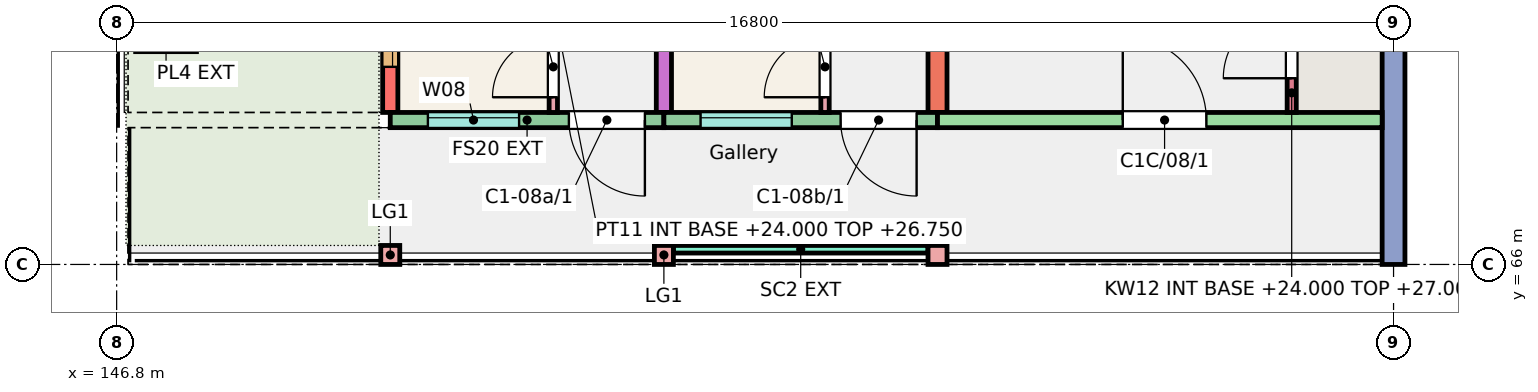
"""IFC4 building model, lengths in metres.
Left out: names, types, materials, properties, quantities, classifications, styles, units other than length and angle.
Written with IfcOpenShell. Run it as: python <this file> out.ifc"""

import sys

from ifc_helpers import new_model, si_unit, direction, frame, frame_2d, origin, origin_2d, place, context, subcontext, project, spatial, rectangle, extrude, element, fill, save


model = new_model("IFC4")
c1 = context("Model", 3, precision=1e-05, world=origin(), true_north=direction((0.0, 1.0)))
c2 = subcontext(c1, "Body", "Model", "MODEL_VIEW")
j1 = project(units=[si_unit("LENGTHUNIT", "METRE"), si_unit("PLANEANGLEUNIT", "RADIAN")], contexts=[c1])
p1 = place(None, origin())
s1 = spatial("IfcSite", under=j1, at=p1, CompositionType="ELEMENT")
p2 = place(p1, origin())
s2 = spatial("IfcBuilding", under=s1, at=p2, CompositionType="ELEMENT")
p3 = place(p2, frame((0.0, 0.0, 24.0)))
s3 = spatial("IfcBuildingStorey", under=s2, at=p3, CompositionType="ELEMENT", Elevation=24.0)
p4 = place(p3, frame((150.4, 68.0, 0.0), z_axis=(0.0, 0.0, 1.0), x_axis=(0.0, 1.0, 0.0)))
e1 = element("IfcWall", 1, at=p4, inside=s3, PredefinedType="SHEAR", context=c2, shape_type="SweptSolid", body=[
    extrude(rectangle(XDim=9.0, YDim=0.2, at=frame_2d((4.5, 0.0))), origin(), (0.0, 0.0, 1.0), 3.0),
])
p5 = place(p4, frame((0.6, 0.0, 0.9)))
e2 = element("IfcOpeningElement", 2, at=p5, cuts=e1, PredefinedType="OPENING", context=c2, shape_type="SweptSolid", body=[
    extrude(rectangle(XDim=1.2, YDim=1.5, at=frame_2d((0.6, 0.75))), frame((0.0, 0.11, 0.0), z_axis=(0.0, -1.0, 0.0), x_axis=(1.0, 0.0, 0.0)), (0.0, 0.0, 1.0), 0.22),
])
p6 = place(p4, frame((7.653, 0.0, 0.9)))
e3 = element("IfcOpeningElement", 3, at=p6, cuts=e1, PredefinedType="OPENING", context=c2, shape_type="SweptSolid", body=[
    extrude(rectangle(XDim=1.2, YDim=1.5, at=frame_2d((0.6, 0.75))), frame((0.0, 0.11, 0.0), z_axis=(0.0, -1.0, 0.0), x_axis=(1.0, 0.0, 0.0)), (0.0, 0.0, 1.0), 0.22),
])
p7 = place(p4, frame((6.405, 0.0, 0.0)))
e4 = element("IfcOpeningElement", 4, at=p7, cuts=e1, PredefinedType="OPENING", context=c2, shape_type="SweptSolid", body=[
    extrude(rectangle(XDim=1.0, YDim=2.1, at=frame_2d((0.5, 1.05))), frame((0.0, 0.11, 0.0), z_axis=(0.0, -1.0, 0.0), x_axis=(1.0, 0.0, 0.0)), (0.0, 0.0, 1.0), 0.22),
])
p8 = place(p3, frame((154.0, 68.0, 0.0), z_axis=(0.0, 0.0, 1.0), x_axis=(0.0, 1.0, 0.0)))
e5 = element("IfcWall", 5, at=p8, inside=s3, PredefinedType="SHEAR", context=c2, shape_type="SweptSolid", body=[
    extrude(rectangle(XDim=9.0, YDim=0.2, at=frame_2d((4.5, 0.0))), origin(), (0.0, 0.0, 1.0), 3.0),
])
p9 = place(p3, frame((157.6, 68.0, 0.0), z_axis=(0.0, 0.0, 1.0), x_axis=(0.0, 1.0, 0.0)))
e6 = element("IfcWall", 6, at=p9, inside=s3, PredefinedType="SHEAR", context=c2, shape_type="SweptSolid", body=[
    extrude(rectangle(XDim=9.0, YDim=0.25, at=frame_2d((4.5, 0.0))), origin(), (0.0, 0.0, 1.0), 3.0),
])
p10 = place(p3, frame((163.6, 66.0, 0.0), z_axis=(0.0, 0.0, 1.0), x_axis=(0.0, 1.0, 0.0)))
e7 = element("IfcWall", 7, at=p10, inside=s3, PredefinedType="SHEAR", context=c2, shape_type="SweptSolid", body=[
    extrude(rectangle(XDim=11.0, YDim=0.3, at=frame_2d((5.5, 0.0))), origin(), (0.0, 0.0, 1.0), 3.0),
])
p11 = place(p3, frame((150.4, 67.9, 0.0), z_axis=(0.0, 0.0, 1.0), x_axis=(1.0, 0.0, 0.0)))
e8 = element("IfcWall", 8, at=p11, inside=s3, PredefinedType="SOLIDWALL", context=c2, shape_type="SweptSolid", body=[
    extrude(rectangle(XDim=3.6, YDim=0.2, at=frame_2d((1.8, 0.0))), origin(), (0.0, 0.0, 1.0), 3.0),
])
p12 = place(p11, frame((0.495, 0.0, 1.1)))
e9 = element("IfcOpeningElement", 9, at=p12, cuts=e8, PredefinedType="OPENING", context=c2, shape_type="SweptSolid", body=[
    extrude(rectangle(XDim=1.2, YDim=1.3, at=frame_2d((0.6, 0.65))), frame((0.0, 0.11, 0.0), z_axis=(0.0, -1.0, 0.0), x_axis=(1.0, 0.0, 0.0)), (0.0, 0.0, 1.0), 0.22),
])
p13 = place(p11, frame((2.35, 0.0, 0.0)))
e10 = element("IfcOpeningElement", 10, at=p13, cuts=e8, PredefinedType="OPENING", context=c2, shape_type="SweptSolid", body=[
    extrude(rectangle(XDim=1.0, YDim=2.1, at=frame_2d((0.5, 1.05))), frame((0.0, 0.11, 0.0), z_axis=(0.0, -1.0, 0.0), x_axis=(1.0, 0.0, 0.0)), (0.0, 0.0, 1.0), 0.22),
])
p14 = place(p3, frame((154.0, 67.9, 0.0), z_axis=(0.0, 0.0, 1.0), x_axis=(1.0, 0.0, 0.0)))
e11 = element("IfcWall", 11, at=p14, inside=s3, PredefinedType="SOLIDWALL", context=c2, shape_type="SweptSolid", body=[
    extrude(rectangle(XDim=3.6, YDim=0.2, at=frame_2d((1.8, 0.0))), origin(), (0.0, 0.0, 1.0), 3.0),
])
p15 = place(p14, frame((0.482, 0.0, 1.1)))
e12 = element("IfcOpeningElement", 12, at=p15, cuts=e11, PredefinedType="OPENING", context=c2, shape_type="SweptSolid", body=[
    extrude(rectangle(XDim=1.2, YDim=1.3, at=frame_2d((0.6, 0.65))), frame((0.0, 0.11, 0.0), z_axis=(0.0, -1.0, 0.0), x_axis=(1.0, 0.0, 0.0)), (0.0, 0.0, 1.0), 0.22),
])
p16 = place(p14, frame((2.325, 0.0, 0.0)))
e13 = element("IfcOpeningElement", 13, at=p16, cuts=e11, PredefinedType="OPENING", context=c2, shape_type="SweptSolid", body=[
    extrude(rectangle(XDim=1.0, YDim=2.1, at=frame_2d((0.5, 1.05))), frame((0.0, 0.11, 0.0), z_axis=(0.0, -1.0, 0.0), x_axis=(1.0, 0.0, 0.0)), (0.0, 0.0, 1.0), 0.22),
])
p17 = place(p3, frame((157.6, 67.9, 0.0), z_axis=(0.0, 0.0, 1.0), x_axis=(1.0, 0.0, 0.0)))
e14 = element("IfcWall", 14, at=p17, inside=s3, PredefinedType="SHEAR", context=c2, shape_type="SweptSolid", body=[
    extrude(rectangle(XDim=5.85, YDim=0.2, at=frame_2d((2.925, 0.0))), origin(), (0.0, 0.0, 1.0), 3.0),
])
p18 = place(p17, frame((2.438, 0.0, 0.0)))
e15 = element("IfcOpeningElement", 15, at=p18, cuts=e14, PredefinedType="OPENING", context=c2, shape_type="SweptSolid", body=[
    extrude(rectangle(XDim=1.1, YDim=2.1, at=frame_2d((0.55, 1.05))), frame((0.0, 0.11, 0.0), z_axis=(0.0, -1.0, 0.0), x_axis=(1.0, 0.0, 0.0)), (0.0, 0.0, 1.0), 0.22),
])
p19 = place(p3, frame((162.26, 68.0, 0.0), z_axis=(0.0, 0.0, 1.0), x_axis=(0.0, 1.0, 0.0)))
e16 = element("IfcWall", 16, at=p19, inside=s3, PredefinedType="SHEAR", context=c2, shape_type="SweptSolid", body=[
    extrude(rectangle(XDim=1.72, YDim=0.12, at=frame_2d((0.86, 0.0))), origin(), (0.0, 0.0, 1.0), 3.0),
])
p20 = place(p19, frame((0.45, 0.0, 0.0)))
e17 = element("IfcOpeningElement", 17, at=p20, cuts=e16, PredefinedType="OPENING", context=c2, shape_type="SweptSolid", body=[
    extrude(rectangle(XDim=0.9, YDim=2.1, at=frame_2d((0.45, 1.05))), frame((0.0, 0.07, 0.0), z_axis=(0.0, -1.0, 0.0), x_axis=(1.0, 0.0, 0.0)), (0.0, 0.0, 1.0), 0.14),
])
for number, where, z_axis, x_axis in (
    (18, (150.4, 66.125, 0.0), (0.0, 0.0, 1.0), (1.0, 0.0, 0.0)),
    (19, (154.0, 66.125, 0.0), (0.0, 0.0, 1.0), (1.0, 0.0, 0.0)),
    (20, (157.6, 66.125, 0.0), (0.0, 0.0, 1.0), (1.0, 0.0, 0.0)),
):
    element("IfcColumn", number, at=place(p3, frame(where, z_axis=z_axis, x_axis=x_axis)), inside=s3, PredefinedType="COLUMN", context=c2, shape_type="SweptSolid", body=[
        extrude(rectangle(XDim=0.25, YDim=0.25, at=origin_2d()), origin(), (0.0, 0.0, 1.0), 3.0),
    ])
p21 = place(p3, frame((147.05, 68.9, 0.01), z_axis=(0.0, 0.0, 1.0), x_axis=(1.0, 0.0, 0.0)))
e21 = element("IfcWall", 21, at=p21, inside=s3, PredefinedType="SOLIDWALL", context=c2, shape_type="SweptSolid", body=[
    extrude(rectangle(XDim=0.8, YDim=0.2, at=frame_2d((0.4, 0.0))), origin(), (0.0, 0.0, 1.0), 0.45),
])
p22 = place(p3, frame((154.125, 66.2, 0.0), z_axis=(0.0, 0.0, 1.0), x_axis=(1.0, 0.0, 0.0)))
e22 = element("IfcWall", 22, at=p22, inside=s3, PredefinedType="SOLIDWALL", context=c2, shape_type="SweptSolid", body=[
    extrude(rectangle(XDim=3.35, YDim=0.1, at=frame_2d((1.675, 0.0))), origin(), (0.0, 0.0, 1.0), 2.45),
])
p23 = place(p3, frame((152.545, 68.0, 0.0), z_axis=(0.0, 0.0, 1.0), x_axis=(0.0, 1.0, 0.0)))
e23 = element("IfcWall", 23, at=p23, inside=s3, PredefinedType="PARTITIONING", context=c2, shape_type="SweptSolid", body=[
    extrude(rectangle(XDim=4.7, YDim=0.11, at=frame_2d((2.35, 0.0))), origin(), (0.0, 0.0, 1.0), 2.75),
])
p24 = place(p23, frame((0.2, 0.0, 0.0)))
e24 = element("IfcOpeningElement", 24, at=p24, cuts=e23, PredefinedType="OPENING", context=c2, shape_type="SweptSolid", body=[
    extrude(rectangle(XDim=0.8, YDim=2.1, at=frame_2d((0.4, 1.05))), frame((0.0, 0.065, 0.0), z_axis=(0.0, -1.0, 0.0), x_axis=(1.0, 0.0, 0.0)), (0.0, 0.0, 1.0), 0.13),
])
p25 = place(p23, frame((3.75, 0.0, 0.0)))
e25 = element("IfcOpeningElement", 25, at=p25, cuts=e23, PredefinedType="OPENING", context=c2, shape_type="SweptSolid", body=[
    extrude(rectangle(XDim=0.8, YDim=2.1, at=frame_2d((0.4, 1.05))), frame((0.0, 0.065, 0.0), z_axis=(0.0, -1.0, 0.0), x_axis=(1.0, 0.0, 0.0)), (0.0, 0.0, 1.0), 0.13),
])
p26 = place(p3, frame((156.12, 68.0, 0.0), z_axis=(0.0, 0.0, 1.0), x_axis=(0.0, 1.0, 0.0)))
e26 = element("IfcWall", 26, at=p26, inside=s3, PredefinedType="PARTITIONING", context=c2, shape_type="SweptSolid", body=[
    extrude(rectangle(XDim=4.3, YDim=0.11, at=frame_2d((2.15, 0.0))), origin(), (0.0, 0.0, 1.0), 2.8),
])
p27 = place(p26, frame((0.2, 0.0, 0.0)))
e27 = element("IfcOpeningElement", 27, at=p27, cuts=e26, PredefinedType="OPENING", context=c2, shape_type="SweptSolid", body=[
    extrude(rectangle(XDim=0.8, YDim=2.1, at=frame_2d((0.4, 1.05))), frame((0.0, 0.065, 0.0), z_axis=(0.0, -1.0, 0.0), x_axis=(1.0, 0.0, 0.0)), (0.0, 0.0, 1.0), 0.13),
])
p28 = place(p26, frame((3.35, 0.0, 0.0)))
e28 = element("IfcOpeningElement", 28, at=p28, cuts=e26, PredefinedType="OPENING", context=c2, shape_type="SweptSolid", body=[
    extrude(rectangle(XDim=0.8, YDim=2.1, at=frame_2d((0.4, 1.05))), frame((0.0, 0.065, 0.0), z_axis=(0.0, -1.0, 0.0), x_axis=(1.0, 0.0, 0.0)), (0.0, 0.0, 1.0), 0.13),
])
p29 = place(p12, origin())
e29 = element("IfcWindow", 29, at=p29, inside=s3, PartitioningType="SINGLE_PANEL", PredefinedType="WINDOW", context=c2, shape_type="SweptSolid", body=[
    extrude(rectangle(XDim=1.2, YDim=1.3, at=frame_2d((0.6, 0.65))), frame((0.0, 0.06, 0.0), z_axis=(0.0, -1.0, 0.0), x_axis=(1.0, 0.0, 0.0)), (0.0, 0.0, 1.0), 0.06),
])
fill(e9, e29)
p30 = place(p5, origin())
e30 = element("IfcWindow", 30, at=p30, inside=s3, PartitioningType="SINGLE_PANEL", PredefinedType="WINDOW", context=c2, shape_type="SweptSolid", body=[
    extrude(rectangle(XDim=1.2, YDim=1.5, at=frame_2d((0.6, 0.75))), frame((0.0, 0.0, 0.0), z_axis=(0.0, -1.0, 0.0), x_axis=(1.0, 0.0, 0.0)), (0.0, 0.0, 1.0), 0.06),
])
fill(e2, e30)
p31 = place(p15, origin())
e31 = element("IfcWindow", 31, at=p31, inside=s3, PartitioningType="SINGLE_PANEL", PredefinedType="WINDOW", context=c2, shape_type="SweptSolid", body=[
    extrude(rectangle(XDim=1.2, YDim=1.3, at=frame_2d((0.6, 0.65))), frame((0.0, 0.06, 0.0), z_axis=(0.0, -1.0, 0.0), x_axis=(1.0, 0.0, 0.0)), (0.0, 0.0, 1.0), 0.06),
])
fill(e12, e31)
p32 = place(p13, origin())
e32 = element("IfcDoor", 32, at=p32, inside=s3, OperationType="SINGLE_SWING_RIGHT", PredefinedType="DOOR", context=c2, shape_type="SweptSolid", body=[
    extrude(rectangle(XDim=1.0, YDim=2.1, at=frame_2d((0.5, 1.05))), frame((0.0, 0.025, 0.0), z_axis=(0.0, -1.0, 0.0), x_axis=(1.0, 0.0, 0.0)), (0.0, 0.0, 1.0), 0.05),
])
fill(e10, e32)
p33 = place(p24, origin())
e33 = element("IfcDoor", 33, at=p33, inside=s3, OperationType="SINGLE_SWING_LEFT", PredefinedType="DOOR", context=c2, shape_type="SweptSolid", body=[
    extrude(rectangle(XDim=0.8, YDim=2.1, at=frame_2d((0.4, 1.05))), frame((0.0, 0.025, 0.0), z_axis=(0.0, -1.0, 0.0), x_axis=(1.0, 0.0, 0.0)), (0.0, 0.0, 1.0), 0.05),
])
fill(e24, e33)
p34 = place(p16, origin())
e34 = element("IfcDoor", 34, at=p34, inside=s3, OperationType="SINGLE_SWING_RIGHT", PredefinedType="DOOR", context=c2, shape_type="SweptSolid", body=[
    extrude(rectangle(XDim=1.0, YDim=2.1, at=frame_2d((0.5, 1.05))), frame((0.0, 0.025, 0.0), z_axis=(0.0, -1.0, 0.0), x_axis=(1.0, 0.0, 0.0)), (0.0, 0.0, 1.0), 0.05),
])
fill(e13, e34)
p35 = place(p27, origin())
e35 = element("IfcDoor", 35, at=p35, inside=s3, OperationType="SINGLE_SWING_LEFT", PredefinedType="DOOR", context=c2, shape_type="SweptSolid", body=[
    extrude(rectangle(XDim=0.8, YDim=2.1, at=frame_2d((0.4, 1.05))), frame((0.0, 0.025, 0.0), z_axis=(0.0, -1.0, 0.0), x_axis=(1.0, 0.0, 0.0)), (0.0, 0.0, 1.0), 0.05),
])
fill(e27, e35)
p36 = place(p18, origin())
e36 = element("IfcDoor", 36, at=p36, inside=s3, OperationType="SINGLE_SWING_LEFT", PredefinedType="DOOR", context=c2, shape_type="SweptSolid", body=[
    extrude(rectangle(XDim=1.1, YDim=2.1, at=frame_2d((0.55, 1.05))), frame((0.0, 0.025, 0.0), z_axis=(0.0, -1.0, 0.0), x_axis=(1.0, 0.0, 0.0)), (0.0, 0.0, 1.0), 0.05),
])
fill(e15, e36)
p37 = place(p20, origin())
e37 = element("IfcDoor", 37, at=p37, inside=s3, OperationType="SINGLE_SWING_LEFT", PredefinedType="DOOR", context=c2, shape_type="SweptSolid", body=[
    extrude(rectangle(XDim=0.9, YDim=2.1, at=frame_2d((0.45, 1.05))), frame((0.0, 0.025, 0.0), z_axis=(0.0, -1.0, 0.0), x_axis=(1.0, 0.0, 0.0)), (0.0, 0.0, 1.0), 0.05),
])
fill(e17, e37)
save(model, sys.argv[1])
